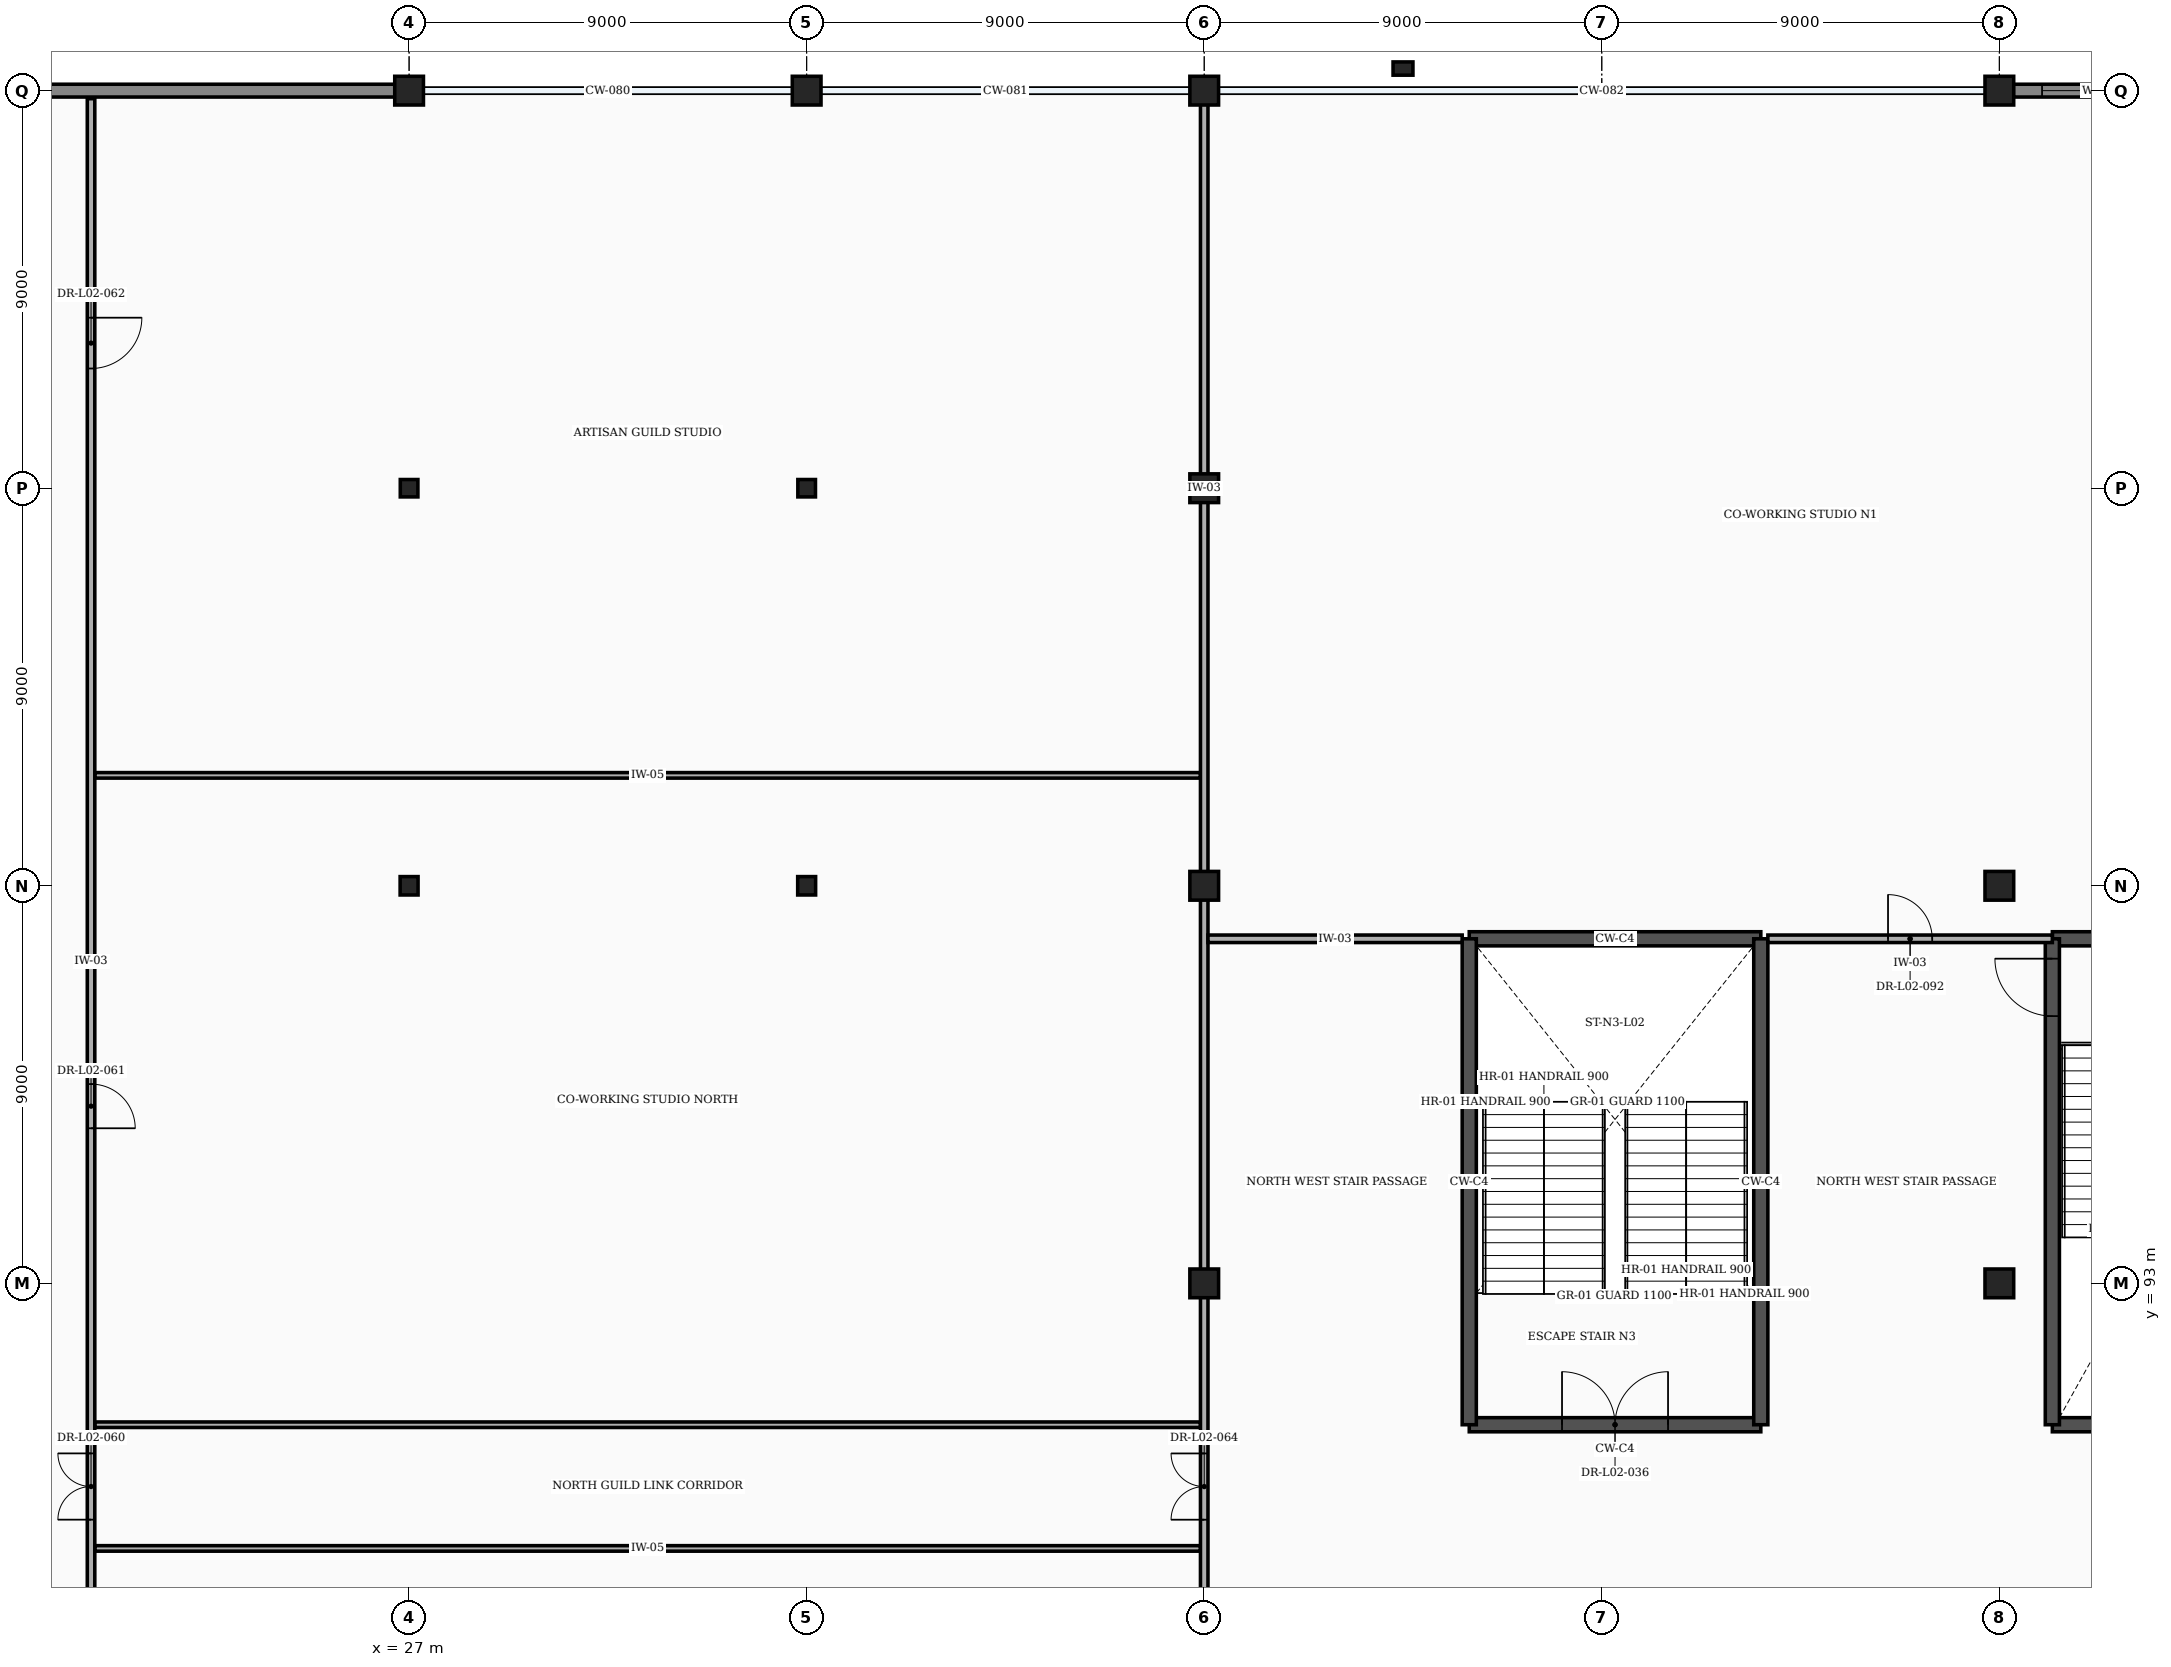
"""IFC4 building model, lengths in metres.
Left out: names, types, materials, properties, quantities, classifications, styles, units other than length and angle.
Written with IfcOpenShell. Run it as: python <this file> out.ifc"""

import sys

from ifc_helpers import new_model, si_unit, direction, frame, frame_2d, origin, origin_2d, place, context, subcontext, project, spatial, rectangle, i_section, extrude, element, fill, save


model = new_model("IFC4")
c1 = context("Model", 3, precision=1e-05, world=origin(), true_north=direction((0.0, 1.0)))
c2 = subcontext(c1, "Body", "Model", "MODEL_VIEW")
j1 = project(units=[si_unit("LENGTHUNIT", "METRE"), si_unit("PLANEANGLEUNIT", "RADIAN")], contexts=[c1])
p1 = place(None, origin())
s1 = spatial("IfcSite", under=j1, at=p1, CompositionType="ELEMENT")
p2 = place(p1, origin())
s2 = spatial("IfcBuilding", under=s1, at=p2, CompositionType="ELEMENT")
p3 = place(p2, frame((0.0, 0.0, 11.4)))
s3 = spatial("IfcBuildingStorey", under=s2, at=p3, CompositionType="ELEMENT", Elevation=11.4)
p4 = place(p3, frame((27.0, 102.0, 0.0), z_axis=(0.0, 0.0, 1.0), x_axis=(1.0, 0.0, 0.0)))
e1 = element("IfcColumn", 1, at=p4, inside=s3, PredefinedType="COLUMN", context=c2, shape_type="SweptSolid", body=[
    extrude(i_section(OverallWidth=0.406, OverallDepth=0.416, WebThickness=0.03, FlangeThickness=0.048, at=origin_2d()), origin(), (0.0, 0.0, 1.0), 5.4),
])
p5 = place(p3, frame((27.0, 111.0, 0.0), z_axis=(0.0, 0.0, 1.0), x_axis=(1.0, 0.0, 0.0)))
e2 = element("IfcColumn", 2, at=p5, inside=s3, PredefinedType="COLUMN", context=c2, shape_type="SweptSolid", body=[
    extrude(i_section(OverallWidth=0.399, OverallDepth=0.394, WebThickness=0.023, FlangeThickness=0.037, at=origin_2d()), origin(), (0.0, 0.0, 1.0), 5.4),
])
p6 = place(p3, frame((27.0, 120.0, 0.0), z_axis=(0.0, 0.0, 1.0), x_axis=(1.0, 0.0, 0.0)))
e3 = element("IfcColumn", 3, at=p6, inside=s3, PredefinedType="COLUMN", context=c2, shape_type="SweptSolid", body=[
    extrude(rectangle(XDim=0.65, YDim=0.65, at=origin_2d()), origin(), (0.0, 0.0, 1.0), 5.4),
])
p7 = place(p3, frame((36.0, 102.0, 0.0), z_axis=(0.0, 0.0, 1.0), x_axis=(1.0, 0.0, 0.0)))
e4 = element("IfcColumn", 4, at=p7, inside=s3, PredefinedType="COLUMN", context=c2, shape_type="SweptSolid", body=[
    extrude(i_section(OverallWidth=0.406, OverallDepth=0.416, WebThickness=0.03, FlangeThickness=0.048, at=origin_2d()), origin(), (0.0, 0.0, 1.0), 5.4),
])
p8 = place(p3, frame((36.0, 111.0, 0.0), z_axis=(0.0, 0.0, 1.0), x_axis=(1.0, 0.0, 0.0)))
e5 = element("IfcColumn", 5, at=p8, inside=s3, PredefinedType="COLUMN", context=c2, shape_type="SweptSolid", body=[
    extrude(i_section(OverallWidth=0.399, OverallDepth=0.394, WebThickness=0.023, FlangeThickness=0.037, at=origin_2d()), origin(), (0.0, 0.0, 1.0), 5.4),
])
for number, where, z_axis, x_axis in (
    (6, (36.0, 120.0, 0.0), (0.0, 0.0, 1.0), (1.0, 0.0, 0.0)),
    (7, (45.0, 93.0, 0.0), (0.0, 0.0, 1.0), (1.0, 0.0, 0.0)),
    (8, (45.0, 102.0, 0.0), (0.0, 0.0, 1.0), (1.0, 0.0, 0.0)),
    (9, (45.0, 111.0, 0.0), (0.0, 0.0, 1.0), (1.0, 0.0, 0.0)),
    (10, (45.0, 120.0, 0.0), (0.0, 0.0, 1.0), (1.0, 0.0, 0.0)),
    (11, (63.0, 93.0, 0.0), (0.0, 0.0, 1.0), (1.0, 0.0, 0.0)),
    (12, (63.0, 102.0, 0.0), (0.0, 0.0, 1.0), (1.0, 0.0, 0.0)),
    (13, (63.0, 120.0, 0.0), (0.0, 0.0, 1.0), (1.0, 0.0, 0.0)),
):
    element("IfcColumn", number, at=place(p3, frame(where, z_axis=z_axis, x_axis=x_axis)), inside=s3, PredefinedType="COLUMN", context=c2, shape_type="SweptSolid", body=[
        extrude(rectangle(XDim=0.65, YDim=0.65, at=origin_2d()), origin(), (0.0, 0.0, 1.0), 5.4),
    ])
p9 = place(p3, frame((49.5, 120.5, 0.0), z_axis=(0.0, 0.0, 1.0), x_axis=(1.0, 0.0, 0.0)))
e14 = element("IfcColumn", 14, at=p9, inside=s3, PredefinedType="PILASTER", context=c2, shape_type="SweptSolid", body=[
    extrude(rectangle(XDim=0.45, YDim=0.3, at=origin_2d()), origin(), (0.0, 0.0, 1.0), 5.4),
])
p10 = place(p3, frame((9.317, 120.0, 0.0), z_axis=(0.0, 0.0, 1.0), x_axis=(1.0, 0.0, 0.0)))
e15 = element("IfcWall", 15, at=p10, inside=s3, PredefinedType="STANDARD", context=c2, shape_type="SweptSolid", body=[
    extrude(rectangle(XDim=17.366, YDim=0.29, at=frame_2d((8.683, 0.0))), origin(), (0.0, 0.0, 1.0), 4.388),
])
p11 = place(p10, frame((0.65, 0.0, 0.85)))
e16 = element("IfcOpeningElement", 16, at=p11, cuts=e15, PredefinedType="OPENING", context=c2, shape_type="SweptSolid", body=[
    extrude(rectangle(XDim=2.7, YDim=2.4, at=frame_2d((1.35, 1.2))), frame((0.0, 0.157, 0.0), z_axis=(0.0, -1.0, 0.0), x_axis=(1.0, 0.0, 0.0)), (0.0, 0.0, 1.0), 0.314),
])
p12 = place(p3, frame((63.317, 120.0, 0.0), z_axis=(0.0, 0.0, 1.0), x_axis=(1.0, 0.0, 0.0)))
e17 = element("IfcWall", 17, at=p12, inside=s3, PredefinedType="STANDARD", context=c2, shape_type="SweptSolid", body=[
    extrude(rectangle(XDim=17.366, YDim=0.29, at=frame_2d((8.683, 0.0))), origin(), (0.0, 0.0, 1.0), 4.38),
])
p13 = place(p12, frame((0.65, 0.0, 0.85)))
e18 = element("IfcOpeningElement", 18, at=p13, cuts=e17, PredefinedType="OPENING", context=c2, shape_type="SweptSolid", body=[
    extrude(rectangle(XDim=2.7, YDim=2.4, at=frame_2d((1.35, 1.2))), frame((0.0, 0.157, 0.0), z_axis=(0.0, -1.0, 0.0), x_axis=(1.0, 0.0, 0.0)), (0.0, 0.0, 1.0), 0.314),
])
for number, where, z_axis, x_axis in (
    (19, (64.2, 89.8, 0.0), (0.0, 0.0, 1.0), (1.0, 0.0, 0.0)),
    (20, (64.2, 100.8, 0.0), (0.0, 0.0, 1.0), (1.0, 0.0, 0.0)),
):
    element("IfcWall", number, at=place(p3, frame(where, z_axis=z_axis, x_axis=x_axis)), inside=s3, PredefinedType="SHEAR", context=c2, shape_type="SweptSolid", body=[
        extrude(rectangle(XDim=6.6, YDim=0.32, at=frame_2d((3.3, 0.0))), origin(), (0.0, 0.0, 1.0), 5.15),
    ])
p14 = place(p3, frame((64.2, 89.8, 0.0), z_axis=(0.0, 0.0, 1.0), x_axis=(0.0, 1.0, 0.0)))
e21 = element("IfcWall", 21, at=p14, inside=s3, PredefinedType="SHEAR", context=c2, shape_type="SweptSolid", body=[
    extrude(rectangle(XDim=11.0, YDim=0.32, at=frame_2d((5.5, 0.0))), origin(), (0.0, 0.0, 1.0), 5.15),
])
p15 = place(p14, frame((9.25, 0.0, 0.0)))
e22 = element("IfcOpeningElement", 22, at=p15, cuts=e21, PredefinedType="OPENING", context=c2, shape_type="SweptSolid", body=[
    extrude(rectangle(XDim=1.3, YDim=2.2, at=frame_2d((0.65, 1.1))), frame((0.0, 0.172, 0.0), z_axis=(0.0, -1.0, 0.0), x_axis=(1.0, 0.0, 0.0)), (0.0, 0.0, 1.0), 0.344),
])
p16 = place(p3, frame((51.0, 89.8, 0.0), z_axis=(0.0, 0.0, 1.0), x_axis=(1.0, 0.0, 0.0)))
e23 = element("IfcWall", 23, at=p16, inside=s3, PredefinedType="SHEAR", context=c2, shape_type="SweptSolid", body=[
    extrude(rectangle(XDim=6.6, YDim=0.32, at=frame_2d((3.3, 0.0))), origin(), (0.0, 0.0, 1.0), 5.15),
])
p17 = place(p16, frame((2.1, 0.0, 0.0)))
e24 = element("IfcOpeningElement", 24, at=p17, cuts=e23, PredefinedType="OPENING", context=c2, shape_type="SweptSolid", body=[
    extrude(rectangle(XDim=2.4, YDim=2.25, at=frame_2d((1.2, 1.125))), frame((0.0, 0.172, 0.0), z_axis=(0.0, -1.0, 0.0), x_axis=(1.0, 0.0, 0.0)), (0.0, 0.0, 1.0), 0.344),
])
p18 = place(p3, frame((51.0, 100.8, 0.0), z_axis=(0.0, 0.0, 1.0), x_axis=(1.0, 0.0, 0.0)))
e25 = element("IfcWall", 25, at=p18, inside=s3, PredefinedType="SHEAR", context=c2, shape_type="SweptSolid", body=[
    extrude(rectangle(XDim=6.6, YDim=0.32, at=frame_2d((3.3, 0.0))), origin(), (0.0, 0.0, 1.0), 5.15),
])
for number, where, z_axis, x_axis in (
    (26, (51.0, 89.8, 0.0), (0.0, 0.0, 1.0), (0.0, 1.0, 0.0)),
    (27, (57.6, 89.8, 0.0), (0.0, 0.0, 1.0), (0.0, 1.0, 0.0)),
):
    element("IfcWall", number, at=place(p3, frame(where, z_axis=z_axis, x_axis=x_axis)), inside=s3, PredefinedType="SHEAR", context=c2, shape_type="SweptSolid", body=[
        extrude(rectangle(XDim=11.0, YDim=0.32, at=frame_2d((5.5, 0.0))), origin(), (0.0, 0.0, 1.0), 5.15),
    ])
for number, where, z_axis, x_axis in (
    (28, (19.885, 87.0, 0.0), (0.0, 0.0, 1.0), (1.0, 0.0, 0.0)),
    (29, (19.885, 89.8, 0.0), (0.0, 0.0, 1.0), (1.0, 0.0, 0.0)),
    (30, (19.885, 104.5, 0.0), (0.0, 0.0, 1.0), (1.0, 0.0, 0.0)),
):
    element("IfcWall", number, at=place(p3, frame(where, z_axis=z_axis, x_axis=x_axis)), inside=s3, PredefinedType="PARTITIONING", context=c2, shape_type="SweptSolid", body=[
        extrude(rectangle(XDim=25.03, YDim=0.125, at=frame_2d((12.515, 0.0))), origin(), (0.0, 0.0, 1.0), 5.15),
    ])
p19 = place(p3, frame((19.8, 80.76, 0.0), z_axis=(0.0, 0.0, 1.0), x_axis=(0.0, 1.0, 0.0)))
e31 = element("IfcWall", 31, at=p19, inside=s3, PredefinedType="PARTITIONING", context=c2, shape_type="SweptSolid", body=[
    extrude(rectangle(XDim=39.057, YDim=0.17, at=frame_2d((19.529, 0.0))), origin(), (0.0, 0.0, 1.0), 5.15),
])
p20 = place(p19, frame((6.891, 0.0, 0.0)))
e32 = element("IfcOpeningElement", 32, at=p20, cuts=e31, PredefinedType="OPENING", context=c2, shape_type="SweptSolid", body=[
    extrude(rectangle(XDim=1.5, YDim=2.2, at=frame_2d((0.75, 1.1))), frame((0.0, 0.097, 0.0), z_axis=(0.0, -1.0, 0.0), x_axis=(1.0, 0.0, 0.0)), (0.0, 0.0, 1.0), 0.194),
])
p21 = place(p19, frame((15.751, 0.0, 0.0)))
e33 = element("IfcOpeningElement", 33, at=p21, cuts=e31, PredefinedType="OPENING", context=c2, shape_type="SweptSolid", body=[
    extrude(rectangle(XDim=1.0, YDim=2.15, at=frame_2d((0.5, 1.075))), frame((0.0, 0.097, 0.0), z_axis=(0.0, -1.0, 0.0), x_axis=(1.0, 0.0, 0.0)), (0.0, 0.0, 1.0), 0.194),
])
p22 = place(p19, frame((32.95, 0.0, 0.0)))
e34 = element("IfcOpeningElement", 34, at=p22, cuts=e31, PredefinedType="OPENING", context=c2, shape_type="SweptSolid", body=[
    extrude(rectangle(XDim=1.15, YDim=2.15, at=frame_2d((0.575, 1.075))), frame((0.0, 0.097, 0.0), z_axis=(0.0, -1.0, 0.0), x_axis=(1.0, 0.0, 0.0)), (0.0, 0.0, 1.0), 0.194),
])
p23 = place(p3, frame((45.0, 84.22, 0.0), z_axis=(0.0, 0.0, 1.0), x_axis=(0.0, 1.0, 0.0)))
e35 = element("IfcWall", 35, at=p23, inside=s3, PredefinedType="PARTITIONING", context=c2, shape_type="SweptSolid", body=[
    extrude(rectangle(XDim=8.56, YDim=0.17, at=frame_2d((4.28, 0.0))), origin(), (0.0, 0.0, 1.0), 4.617),
])
p24 = place(p23, frame((3.43, 0.0, 0.0)))
e36 = element("IfcOpeningElement", 36, at=p24, cuts=e35, PredefinedType="OPENING", context=c2, shape_type="SweptSolid", body=[
    extrude(rectangle(XDim=1.5, YDim=2.2, at=frame_2d((0.75, 1.1))), frame((0.0, 0.097, 0.0), z_axis=(0.0, -1.0, 0.0), x_axis=(1.0, 0.0, 0.0)), (0.0, 0.0, 1.0), 0.194),
])
p25 = place(p3, frame((45.0, 93.22, 0.0), z_axis=(0.0, 0.0, 1.0), x_axis=(0.0, 1.0, 0.0)))
e37 = element("IfcWall", 37, at=p25, inside=s3, PredefinedType="PARTITIONING", context=c2, shape_type="SweptSolid", body=[
    extrude(rectangle(XDim=8.56, YDim=0.17, at=frame_2d((4.28, 0.0))), origin(), (0.0, 0.0, 1.0), 4.617),
])
p26 = place(p3, frame((45.0, 102.22, 0.0), z_axis=(0.0, 0.0, 1.0), x_axis=(0.0, 1.0, 0.0)))
e38 = element("IfcWall", 38, at=p26, inside=s3, PredefinedType="PARTITIONING", context=c2, shape_type="SweptSolid", body=[
    extrude(rectangle(XDim=17.56, YDim=0.17, at=frame_2d((8.78, 0.0))), origin(), (0.0, 0.0, 1.0), 4.609),
])
p27 = place(p3, frame((45.085, 100.8, 0.0), z_axis=(0.0, 0.0, 1.0), x_axis=(1.0, 0.0, 0.0)))
e39 = element("IfcWall", 39, at=p27, inside=s3, PredefinedType="PARTITIONING", context=c2, shape_type="SweptSolid", body=[
    extrude(rectangle(XDim=5.755, YDim=0.17, at=frame_2d((2.877, 0.0))), origin(), (0.0, 0.0, 1.0), 5.15),
])
p28 = place(p3, frame((57.76, 100.8, 0.0), z_axis=(0.0, 0.0, 1.0), x_axis=(1.0, 0.0, 0.0)))
e40 = element("IfcWall", 40, at=p28, inside=s3, PredefinedType="PARTITIONING", context=c2, shape_type="SweptSolid", body=[
    extrude(rectangle(XDim=6.44, YDim=0.17, at=frame_2d((3.22, 0.0))), origin(), (0.0, 0.0, 1.0), 5.15),
])
p29 = place(p28, frame((2.72, 0.0, 0.0)))
e41 = element("IfcOpeningElement", 41, at=p29, cuts=e40, PredefinedType="OPENING", context=c2, shape_type="SweptSolid", body=[
    extrude(rectangle(XDim=1.0, YDim=2.15, at=frame_2d((0.5, 1.075))), frame((0.0, 0.097, 0.0), z_axis=(0.0, -1.0, 0.0), x_axis=(1.0, 0.0, 0.0)), (0.0, 0.0, 1.0), 0.194),
])
p30 = place(p13, origin())
e42 = element("IfcWindow", 42, at=p30, inside=s3, PartitioningType="SINGLE_PANEL", PredefinedType="WINDOW", context=c2, shape_type="SweptSolid", body=[
    extrude(rectangle(XDim=2.7, YDim=2.4, at=frame_2d((1.35, 1.2))), frame((0.0, 0.03, 0.0), z_axis=(0.0, -1.0, 0.0), x_axis=(1.0, 0.0, 0.0)), (0.0, 0.0, 1.0), 0.06),
])
fill(e18, e42)
p31 = place(p15, origin())
e43 = element("IfcDoor", 43, at=p31, inside=s3, OperationType="SINGLE_SWING_RIGHT", PredefinedType="DOOR", context=c2, shape_type="SweptSolid", body=[
    extrude(rectangle(XDim=1.3, YDim=2.2, at=frame_2d((0.65, 1.1))), frame((0.0, 0.025, 0.0), z_axis=(0.0, -1.0, 0.0), x_axis=(1.0, 0.0, 0.0)), (0.0, 0.0, 1.0), 0.05),
])
fill(e22, e43)
p32 = place(p17, origin())
e44 = element("IfcDoor", 44, at=p32, inside=s3, OperationType="DOUBLE_DOOR_SINGLE_SWING", PredefinedType="DOOR", context=c2, shape_type="SweptSolid", body=[
    extrude(rectangle(XDim=2.4, YDim=2.25, at=frame_2d((1.2, 1.125))), frame((0.0, 0.025, 0.0), z_axis=(0.0, -1.0, 0.0), x_axis=(1.0, 0.0, 0.0)), (0.0, 0.0, 1.0), 0.05),
])
fill(e24, e44)
p33 = place(p20, origin())
e45 = element("IfcDoor", 45, at=p33, inside=s3, OperationType="DOUBLE_DOOR_SINGLE_SWING", PredefinedType="DOOR", context=c2, shape_type="SweptSolid", body=[
    extrude(rectangle(XDim=1.5, YDim=2.2, at=frame_2d((0.75, 1.1))), frame((0.0, 0.025, 0.0), z_axis=(0.0, -1.0, 0.0), x_axis=(1.0, 0.0, 0.0)), (0.0, 0.0, 1.0), 0.05),
])
fill(e32, e45)
p34 = place(p21, frame((1.0, 0.0, 0.0), z_axis=(0.0, 0.0, 1.0), x_axis=(-1.0, 0.0, 0.0)))
e46 = element("IfcDoor", 46, at=p34, inside=s3, OperationType="SINGLE_SWING_RIGHT", PredefinedType="DOOR", context=c2, shape_type="SweptSolid", body=[
    extrude(rectangle(XDim=1.0, YDim=2.15, at=frame_2d((0.5, 1.075))), frame((0.0, 0.025, 0.0), z_axis=(0.0, -1.0, 0.0), x_axis=(1.0, 0.0, 0.0)), (0.0, 0.0, 1.0), 0.05),
])
fill(e33, e46)
p35 = place(p22, frame((1.15, 0.0, 0.0), z_axis=(0.0, 0.0, 1.0), x_axis=(-1.0, 0.0, 0.0)))
e47 = element("IfcDoor", 47, at=p35, inside=s3, OperationType="SINGLE_SWING_LEFT", PredefinedType="DOOR", context=c2, shape_type="SweptSolid", body=[
    extrude(rectangle(XDim=1.15, YDim=2.15, at=frame_2d((0.575, 1.075))), frame((0.0, 0.025, 0.0), z_axis=(0.0, -1.0, 0.0), x_axis=(1.0, 0.0, 0.0)), (0.0, 0.0, 1.0), 0.05),
])
fill(e34, e47)
p36 = place(p24, origin())
e48 = element("IfcDoor", 48, at=p36, inside=s3, OperationType="DOUBLE_DOOR_SINGLE_SWING", PredefinedType="DOOR", context=c2, shape_type="SweptSolid", body=[
    extrude(rectangle(XDim=1.5, YDim=2.2, at=frame_2d((0.75, 1.1))), frame((0.0, 0.025, 0.0), z_axis=(0.0, -1.0, 0.0), x_axis=(1.0, 0.0, 0.0)), (0.0, 0.0, 1.0), 0.05),
])
fill(e36, e48)
p37 = place(p29, origin())
e49 = element("IfcDoor", 49, at=p37, inside=s3, OperationType="SINGLE_SWING_LEFT", PredefinedType="DOOR", context=c2, shape_type="SweptSolid", body=[
    extrude(rectangle(XDim=1.0, YDim=2.15, at=frame_2d((0.5, 1.075))), frame((0.0, 0.025, 0.0), z_axis=(0.0, -1.0, 0.0), x_axis=(1.0, 0.0, 0.0)), (0.0, 0.0, 1.0), 0.05),
])
fill(e41, e49)
save(model, sys.argv[1])
